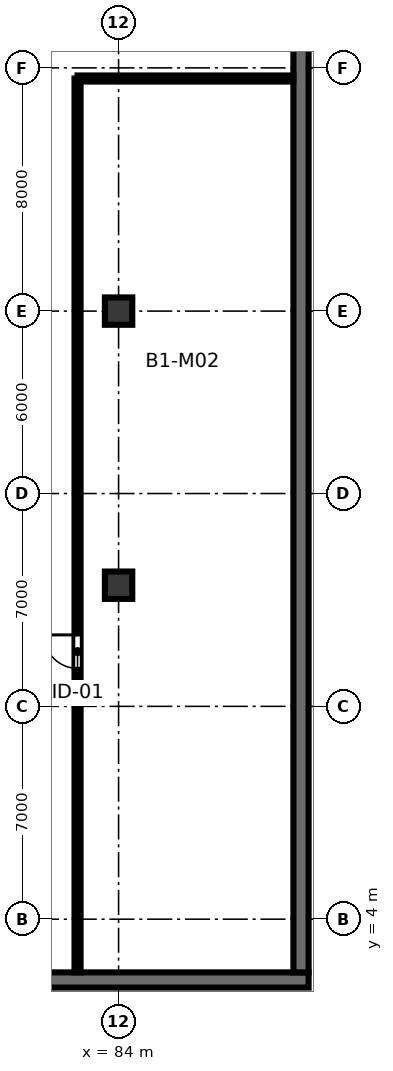
"""IFC4 building model, lengths in metres.
Left out: names, types, materials, properties, quantities, classifications, styles, units other than length and angle.
Written with IfcOpenShell. Run it as: python <this file> out.ifc"""

import sys

from ifc_helpers import new_model, si_unit, direction, frame, frame_2d, origin, origin_2d, place, context, subcontext, project, spatial, rectangle, extrude, element, fill, save


model = new_model("IFC4")
c1 = context("Model", 3, precision=1e-05, world=origin(), true_north=direction((0.0, 1.0)))
c2 = subcontext(c1, "Body", "Model", "MODEL_VIEW")
j1 = project(units=[si_unit("LENGTHUNIT", "METRE"), si_unit("PLANEANGLEUNIT", "RADIAN")], contexts=[c1])
p1 = place(None, origin())
s1 = spatial("IfcSite", under=j1, at=p1, CompositionType="ELEMENT")
p2 = place(p1, origin())
s2 = spatial("IfcBuilding", under=s1, at=p2, CompositionType="ELEMENT")
p3 = place(p2, frame((0.0, 0.0, -4.2)))
s3 = spatial("IfcBuildingStorey", under=s2, at=p3, CompositionType="ELEMENT", Elevation=-4.2)
p4 = place(p3, frame((1.75, 2.0, 0.0), z_axis=(0.0, 0.0, 1.0), x_axis=(1.0, 0.0, 0.0)))
e1 = element("IfcWall", 1, at=p4, inside=s3, PredefinedType="SOLIDWALL", context=c2, shape_type="SweptSolid", body=[
    extrude(rectangle(XDim=88.5, YDim=0.5, at=frame_2d((44.25, 0.0))), origin(), (0.0, 0.0, 1.0), 3.85),
])
p5 = place(p3, frame((90.0, 2.25, 0.0), z_axis=(0.0, 0.0, 1.0), x_axis=(0.0, 1.0, 0.0)))
e2 = element("IfcWall", 2, at=p5, inside=s3, PredefinedType="SOLIDWALL", context=c2, shape_type="SweptSolid", body=[
    extrude(rectangle(XDim=59.5, YDim=0.5, at=frame_2d((29.75, 0.0))), origin(), (0.0, 0.0, 1.0), 3.85),
])
for number, where, z_axis, x_axis in (
    (3, (84.0, 14.984, 0.0), (0.0, 0.0, 1.0), (1.0, 0.0, 0.0)),
    (4, (84.0, 24.0, 0.0), (0.0, 0.0, 1.0), (1.0, 0.0, 0.0)),
):
    element("IfcColumn", number, at=place(p3, frame(where, z_axis=z_axis, x_axis=x_axis)), inside=s3, PredefinedType="COLUMN", context=c2, shape_type="SweptSolid", body=[
        extrude(rectangle(XDim=0.9, YDim=0.9, at=origin_2d()), origin(), (0.0, 0.0, 1.0), 3.848),
    ])
p6 = place(p3, frame((82.65, 2.25, 0.0), z_axis=(0.0, 0.0, 1.0), x_axis=(0.0, 1.0, 0.0)))
e5 = element("IfcWall", 5, at=p6, inside=s3, PredefinedType="PARTITIONING", context=c2, shape_type="SweptSolid", body=[
    extrude(rectangle(XDim=29.4, YDim=0.2, at=frame_2d((14.7, 0.0))), origin(), (0.0, 0.0, 1.0), 2.95),
])
p7 = place(p6, frame((10.0, 0.0, 0.0)))
e6 = element("IfcOpeningElement", 6, at=p7, cuts=e5, PredefinedType="OPENING", context=c2, shape_type="SweptSolid", body=[
    extrude(rectangle(XDim=1.1, YDim=2.15, at=frame_2d((0.55, 1.075))), frame((0.0, 0.11, 0.0), z_axis=(0.0, -1.0, 0.0), x_axis=(1.0, 0.0, 0.0)), (0.0, 0.0, 1.0), 0.22),
])
p8 = place(p3, frame((82.65, 31.65, 0.0), z_axis=(0.0, 0.0, 1.0), x_axis=(1.0, 0.0, 0.0)))
e7 = element("IfcWall", 7, at=p8, inside=s3, PredefinedType="PARTITIONING", context=c2, shape_type="SweptSolid", body=[
    extrude(rectangle(XDim=7.1, YDim=0.2, at=frame_2d((3.55, 0.0))), origin(), (0.0, 0.0, 1.0), 2.95),
])
p9 = place(p7, origin())
e8 = element("IfcDoor", 8, at=p9, inside=s3, OperationType="SINGLE_SWING_RIGHT", PredefinedType="DOOR", context=c2, shape_type="SweptSolid", body=[
    extrude(rectangle(XDim=1.1, YDim=2.15, at=frame_2d((0.55, 1.075))), frame((0.0, 0.025, 0.0), z_axis=(0.0, -1.0, 0.0), x_axis=(1.0, 0.0, 0.0)), (0.0, 0.0, 1.0), 0.05),
])
fill(e6, e8)
save(model, sys.argv[1])
